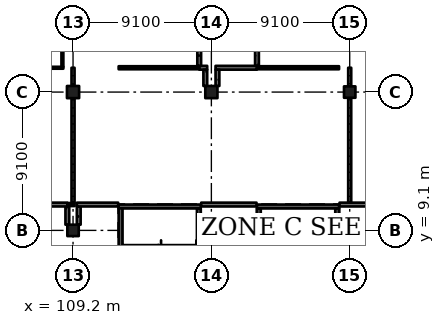
"""IFC4 building model, lengths in metres.
Left out: names, types, materials, properties, quantities, classifications, styles, units other than length and angle.
Written with IfcOpenShell. Run it as: python <this file> out.ifc"""

import sys

from ifc_helpers import new_model, si_unit, direction, frame, frame_2d, origin, origin_2d, place, context, subcontext, project, spatial, rectangle, extrude, element, fill, save


model = new_model("IFC4")
c1 = context("Model", 3, precision=1e-05, world=origin(), true_north=direction((0.0, 1.0)))
c2 = subcontext(c1, "Body", "Model", "MODEL_VIEW")
j1 = project(units=[si_unit("LENGTHUNIT", "METRE"), si_unit("PLANEANGLEUNIT", "RADIAN")], contexts=[c1])
p1 = place(None, origin())
s1 = spatial("IfcSite", under=j1, at=p1, CompositionType="ELEMENT")
p2 = place(p1, origin())
s2 = spatial("IfcBuilding", under=s1, at=p2, CompositionType="ELEMENT")
p3 = place(p2, frame((0.0, 0.0, 10.92)))
s3 = spatial("IfcBuildingStorey", under=s2, at=p3, CompositionType="ELEMENT", Elevation=10.92)
p4 = place(p3, frame((109.2, 9.1, 0.0), z_axis=(0.0, 0.0, 1.0), x_axis=(1.0, 0.0, 0.0)))
e1 = element("IfcColumn", 1, at=p4, inside=s3, PredefinedType="COLUMN", context=c2, shape_type="SweptSolid", body=[
    extrude(rectangle(XDim=0.75, YDim=0.75, at=origin_2d()), origin(), (0.0, 0.0, 1.0), 4.55),
])
p5 = place(p3, frame((109.2, 18.2, 0.0), z_axis=(0.0, 0.0, 1.0), x_axis=(1.0, 0.0, 0.0)))
e2 = element("IfcColumn", 2, at=p5, inside=s3, PredefinedType="COLUMN", context=c2, shape_type="SweptSolid", body=[
    extrude(rectangle(XDim=0.8, YDim=0.8, at=origin_2d()), origin(), (0.0, 0.0, 1.0), 4.55),
])
p6 = place(p3, frame((118.3, 9.1, 0.0), z_axis=(0.0, 0.0, 1.0), x_axis=(1.0, 0.0, 0.0)))
e3 = element("IfcColumn", 3, at=p6, inside=s3, PredefinedType="COLUMN", context=c2, shape_type="SweptSolid", body=[
    extrude(rectangle(XDim=0.65, YDim=0.65, at=origin_2d()), origin(), (0.0, 0.0, 1.0), 4.55),
])
p7 = place(p3, frame((118.3, 18.2, 0.0), z_axis=(0.0, 0.0, 1.0), x_axis=(1.0, 0.0, 0.0)))
e4 = element("IfcColumn", 4, at=p7, inside=s3, PredefinedType="COLUMN", context=c2, shape_type="SweptSolid", body=[
    extrude(rectangle(XDim=0.8, YDim=0.8, at=origin_2d()), origin(), (0.0, 0.0, 1.0), 4.55),
])
p8 = place(p3, frame((127.4, 9.1, 0.0), z_axis=(0.0, 0.0, 1.0), x_axis=(1.0, 0.0, 0.0)))
e5 = element("IfcColumn", 5, at=p8, inside=s3, PredefinedType="COLUMN", context=c2, shape_type="SweptSolid", body=[
    extrude(rectangle(XDim=0.65, YDim=0.65, at=origin_2d()), origin(), (0.0, 0.0, 1.0), 4.55),
])
p9 = place(p3, frame((127.4, 18.2, 0.0), z_axis=(0.0, 0.0, 1.0), x_axis=(1.0, 0.0, 0.0)))
e6 = element("IfcColumn", 6, at=p9, inside=s3, PredefinedType="COLUMN", context=c2, shape_type="SweptSolid", body=[
    extrude(rectangle(XDim=0.75, YDim=0.75, at=origin_2d()), origin(), (0.0, 0.0, 1.0), 4.55),
])
p10 = place(p3, frame((126.7, 10.675, 0.0), z_axis=(0.0, 0.0, 1.0), x_axis=(-1.0, 0.0, 0.0)))
e7 = element("IfcWall", 7, at=p10, inside=s3, PredefinedType="SHEAR", context=c2, shape_type="SweptSolid", body=[
    extrude(rectangle(XDim=5.4, YDim=0.25, at=frame_2d((2.7, 0.0))), origin(), (0.0, 0.0, 1.0), 4.55),
])
p11 = place(p10, frame((1.5, 0.0, 0.0)))
e8 = element("IfcOpeningElement", 8, at=p11, cuts=e7, PredefinedType="OPENING", context=c2, shape_type="SweptSolid", body=[
    extrude(rectangle(XDim=2.4, YDim=2.1, at=frame_2d((1.2, 1.05))), frame((0.0, 0.135, 0.0), z_axis=(0.0, -1.0, 0.0), x_axis=(1.0, 0.0, 0.0)), (0.0, 0.0, 1.0), 0.27),
])
for number, where, z_axis, x_axis in (
    (9, (121.425, 10.55, 0.0), (0.0, 0.0, 1.0), (0.0, -1.0, 0.0)),
    (10, (126.575, 10.55, 0.0), (0.0, 0.0, 1.0), (0.0, -1.0, 0.0)),
):
    element("IfcWall", number, at=place(p3, frame(where, z_axis=z_axis, x_axis=x_axis)), inside=s3, PredefinedType="SHEAR", context=c2, shape_type="SweptSolid", body=[
        extrude(rectangle(XDim=9.6, YDim=0.25, at=frame_2d((4.8, 0.0))), origin(), (0.0, 0.0, 1.0), 4.55),
    ])
p12 = place(p3, frame((117.6, 10.675, 0.0), z_axis=(0.0, 0.0, 1.0), x_axis=(-1.0, 0.0, 0.0)))
e11 = element("IfcWall", 11, at=p12, inside=s3, PredefinedType="SHEAR", context=c2, shape_type="SweptSolid", body=[
    extrude(rectangle(XDim=5.4, YDim=0.25, at=frame_2d((2.7, 0.0))), origin(), (0.0, 0.0, 1.0), 4.55),
])
p13 = place(p12, frame((1.5, 0.0, 0.0)))
e12 = element("IfcOpeningElement", 12, at=p13, cuts=e11, PredefinedType="OPENING", context=c2, shape_type="SweptSolid", body=[
    extrude(rectangle(XDim=2.4, YDim=2.1, at=frame_2d((1.2, 1.05))), frame((0.0, 0.135, 0.0), z_axis=(0.0, -1.0, 0.0), x_axis=(1.0, 0.0, 0.0)), (0.0, 0.0, 1.0), 0.27),
])
for number, where, z_axis, x_axis in (
    (13, (112.325, 10.55, 0.0), (0.0, 0.0, 1.0), (0.0, -1.0, 0.0)),
    (14, (117.475, 10.55, 0.0), (0.0, 0.0, 1.0), (0.0, -1.0, 0.0)),
):
    element("IfcWall", number, at=place(p3, frame(where, z_axis=z_axis, x_axis=x_axis)), inside=s3, PredefinedType="SHEAR", context=c2, shape_type="SweptSolid", body=[
        extrude(rectangle(XDim=9.6, YDim=0.25, at=frame_2d((4.8, 0.0))), origin(), (0.0, 0.0, 1.0), 4.55),
    ])
p14 = place(p3, frame((104.95, 19.8, 0.0), z_axis=(0.0, 0.0, 1.0), x_axis=(1.0, 0.0, 0.0)))
e15 = element("IfcWall", 15, at=p14, inside=s3, PredefinedType="PARTITIONING", context=c2, shape_type="SweptSolid", body=[
    extrude(rectangle(XDim=3.613, YDim=0.125, at=frame_2d((1.806, 0.0))), origin(), (0.0, 0.0, 1.0), 4.25),
])
p15 = place(p14, frame((1.35, 0.0, 0.0)))
e16 = element("IfcOpeningElement", 16, at=p15, cuts=e15, PredefinedType="OPENING", context=c2, shape_type="SweptSolid", body=[
    extrude(rectangle(XDim=0.9, YDim=2.1, at=frame_2d((0.45, 1.05))), frame((0.0, 0.073, 0.0), z_axis=(0.0, -1.0, 0.0), x_axis=(1.0, 0.0, 0.0)), (0.0, 0.0, 1.0), 0.145),
])
p16 = place(p3, frame((108.5, 19.863, 0.0), z_axis=(0.0, 0.0, 1.0), x_axis=(0.0, 1.0, 0.0)))
e17 = element("IfcWall", 17, at=p16, inside=s3, PredefinedType="PARTITIONING", context=c2, shape_type="SweptSolid", body=[
    extrude(rectangle(XDim=7.0, YDim=0.125, at=frame_2d((3.5, 0.0))), origin(), (0.0, 0.0, 1.0), 4.25),
])
p17 = place(p3, frame((108.825, 9.475, 0.0), z_axis=(0.0, 0.0, 1.0), x_axis=(0.0, 1.0, 0.0)))
e18 = element("IfcWall", 18, at=p17, inside=s3, PredefinedType="SOLIDWALL", context=c2, shape_type="SweptSolid", body=[
    extrude(rectangle(XDim=1.2, YDim=0.25, at=frame_2d((0.6, 0.0))), origin(), (0.0, 0.0, 1.0), 4.25),
])
p18 = place(p3, frame((108.825, 10.8, 0.0), z_axis=(0.0, 0.0, 1.0), x_axis=(-1.0, 0.0, 0.0)))
e19 = element("IfcWall", 19, at=p18, inside=s3, PredefinedType="SOLIDWALL", context=c2, shape_type="SweptSolid", body=[
    extrude(rectangle(XDim=4.05, YDim=0.25, at=frame_2d((2.025, 0.0))), origin(), (0.0, 0.0, 1.0), 4.25),
])
p19 = place(p18, frame((1.15, 0.0, 0.0)))
e20 = element("IfcOpeningElement", 20, at=p19, cuts=e19, PredefinedType="OPENING", context=c2, shape_type="SweptSolid", body=[
    extrude(rectangle(XDim=1.8, YDim=2.1, at=frame_2d((0.9, 1.05))), frame((0.0, 0.135, 0.0), z_axis=(0.0, -1.0, 0.0), x_axis=(1.0, 0.0, 0.0)), (0.0, 0.0, 1.0), 0.27),
])
p20 = place(p3, frame((108.825, 10.8, 0.0), z_axis=(0.0, 0.0, 1.0), x_axis=(1.0, 0.0, 0.0)))
e21 = element("IfcWall", 21, at=p20, inside=s3, PredefinedType="PARTITIONING", context=c2, shape_type="SweptSolid", body=[
    extrude(rectangle(XDim=0.475, YDim=0.2, at=frame_2d((0.238, 0.0))), origin(), (0.0, 0.0, 1.0), 4.25),
])
p21 = place(p3, frame((109.2, 10.9, 0.0), z_axis=(0.0, 0.0, 1.0), x_axis=(0.0, 1.0, 0.0)))
e22 = element("IfcWall", 22, at=p21, inside=s3, PredefinedType="PARTITIONING", context=c2, shape_type="SweptSolid", body=[
    extrude(rectangle(XDim=6.9, YDim=0.2, at=frame_2d((3.45, 0.0))), origin(), (0.0, 0.0, 1.0), 3.55),
])
p22 = place(p21, frame((0.85, 0.0, 0.0)))
e23 = element("IfcOpeningElement", 23, at=p22, cuts=e22, PredefinedType="OPENING", context=c2, shape_type="SweptSolid", body=[
    extrude(rectangle(XDim=1.8, YDim=2.4, at=frame_2d((0.9, 1.2))), frame((0.0, 0.11, 0.0), z_axis=(0.0, -1.0, 0.0), x_axis=(1.0, 0.0, 0.0)), (0.0, 0.0, 1.0), 0.22),
])
p23 = place(p21, frame((4.25, 0.0, 0.0)))
e24 = element("IfcOpeningElement", 24, at=p23, cuts=e22, PredefinedType="OPENING", context=c2, shape_type="SweptSolid", body=[
    extrude(rectangle(XDim=1.8, YDim=2.4, at=frame_2d((0.9, 1.2))), frame((0.0, 0.11, 0.0), z_axis=(0.0, -1.0, 0.0), x_axis=(1.0, 0.0, 0.0)), (0.0, 0.0, 1.0), 0.22),
])
p24 = place(p3, frame((109.2, 18.6, 0.0), z_axis=(0.0, 0.0, 1.0), x_axis=(0.0, 1.0, 0.0)))
e25 = element("IfcWall", 25, at=p24, inside=s3, PredefinedType="PARTITIONING", context=c2, shape_type="SweptSolid", body=[
    extrude(rectangle(XDim=1.2, YDim=0.2, at=frame_2d((0.6, 0.0))), origin(), (0.0, 0.0, 1.0), 3.55),
])
p25 = place(p3, frame((109.575, 10.675, 0.0), z_axis=(0.0, 0.0, 1.0), x_axis=(0.0, -1.0, 0.0)))
e26 = element("IfcWall", 26, at=p25, inside=s3, PredefinedType="SOLIDWALL", context=c2, shape_type="SweptSolid", body=[
    extrude(rectangle(XDim=1.2, YDim=0.25, at=frame_2d((0.6, 0.0))), origin(), (0.0, 0.0, 1.0), 4.25),
])
p26 = place(p3, frame((112.17, 10.8, 0.0), z_axis=(0.0, 0.0, 1.0), x_axis=(-1.0, 0.0, 0.0)))
e27 = element("IfcWall", 27, at=p26, inside=s3, PredefinedType="SOLIDWALL", context=c2, shape_type="SweptSolid", body=[
    extrude(rectangle(XDim=2.72, YDim=0.25, at=frame_2d((1.36, 0.0))), origin(), (0.0, 0.0, 1.0), 4.25),
])
p27 = place(p3, frame((112.2, 19.8, 0.0), z_axis=(0.0, 0.0, 1.0), x_axis=(1.0, 0.0, 0.0)))
e28 = element("IfcWall", 28, at=p27, inside=s3, PredefinedType="PARTITIONING", context=c2, shape_type="SweptSolid", body=[
    extrude(rectangle(XDim=5.3, YDim=0.2, at=frame_2d((2.65, 0.0))), origin(), (0.0, 0.0, 1.0), 4.25),
])
p28 = place(p27, frame((1.75, 0.0, 0.0)))
e29 = element("IfcOpeningElement", 29, at=p28, cuts=e28, PredefinedType="OPENING", context=c2, shape_type="SweptSolid", body=[
    extrude(rectangle(XDim=1.8, YDim=2.4, at=frame_2d((0.9, 1.2))), frame((0.0, 0.11, 0.0), z_axis=(0.0, -1.0, 0.0), x_axis=(1.0, 0.0, 0.0)), (0.0, 0.0, 1.0), 0.22),
])
p29 = place(p3, frame((117.5, 19.8, 0.0), z_axis=(0.0, 0.0, 1.0), x_axis=(1.0, 0.0, 0.0)))
e30 = element("IfcWall", 30, at=p29, inside=s3, PredefinedType="SOLIDWALL", context=c2, shape_type="SweptSolid", body=[
    extrude(rectangle(XDim=0.525, YDim=0.25, at=frame_2d((0.262, 0.0))), origin(), (0.0, 0.0, 1.0), 4.25),
])
p30 = place(p3, frame((117.5, 19.925, 0.0), z_axis=(0.0, 0.0, 1.0), x_axis=(0.0, 1.0, 0.0)))
e31 = element("IfcWall", 31, at=p30, inside=s3, PredefinedType="SOLIDWALL", context=c2, shape_type="SweptSolid", body=[
    extrude(rectangle(XDim=2.845, YDim=0.25, at=frame_2d((1.422, 0.0))), origin(), (0.0, 0.0, 1.0), 4.25),
])
p31 = place(p3, frame((117.63, 8.775, 0.0), z_axis=(0.0, 0.0, 1.0), x_axis=(1.0, 0.0, 0.0)))
e32 = element("IfcWall", 32, at=p31, inside=s3, PredefinedType="SOLIDWALL", context=c2, shape_type="SweptSolid", body=[
    extrude(rectangle(XDim=0.345, YDim=0.25, at=frame_2d((0.173, 0.0))), origin(), (0.0, 0.0, 1.0), 4.25),
])
p32 = place(p3, frame((117.9, 19.675, 0.0), z_axis=(0.0, 0.0, 1.0), x_axis=(0.0, -1.0, 0.0)))
e33 = element("IfcWall", 33, at=p32, inside=s3, PredefinedType="SOLIDWALL", context=c2, shape_type="SweptSolid", body=[
    extrude(rectangle(XDim=1.075, YDim=0.25, at=frame_2d((0.538, 0.0))), origin(), (0.0, 0.0, 1.0), 4.25),
])
p33 = place(p3, frame((117.975, 9.425, 0.0), z_axis=(0.0, 0.0, 1.0), x_axis=(-1.0, 0.0, 0.0)))
e34 = element("IfcWall", 34, at=p33, inside=s3, PredefinedType="SOLIDWALL", context=c2, shape_type="SweptSolid", body=[
    extrude(rectangle(XDim=0.345, YDim=0.25, at=frame_2d((0.173, 0.0))), origin(), (0.0, 0.0, 1.0), 4.25),
])
p34 = place(p3, frame((118.575, 19.8, 0.0), z_axis=(0.0, 0.0, 1.0), x_axis=(1.0, 0.0, 0.0)))
e35 = element("IfcWall", 35, at=p34, inside=s3, PredefinedType="SOLIDWALL", context=c2, shape_type="SweptSolid", body=[
    extrude(rectangle(XDim=2.725, YDim=0.25, at=frame_2d((1.363, 0.0))), origin(), (0.0, 0.0, 1.0), 4.25),
])
p35 = place(p34, frame((0.85, 0.0, 0.0)))
e36 = element("IfcOpeningElement", 36, at=p35, cuts=e35, PredefinedType="OPENING", context=c2, shape_type="SweptSolid", body=[
    extrude(rectangle(XDim=1.0, YDim=2.1, at=frame_2d((0.5, 1.05))), frame((0.0, 0.135, 0.0), z_axis=(0.0, -1.0, 0.0), x_axis=(1.0, 0.0, 0.0)), (0.0, 0.0, 1.0), 0.27),
])
p36 = place(p3, frame((118.7, 18.6, 0.0), z_axis=(0.0, 0.0, 1.0), x_axis=(0.0, 1.0, 0.0)))
e37 = element("IfcWall", 37, at=p36, inside=s3, PredefinedType="SOLIDWALL", context=c2, shape_type="SweptSolid", body=[
    extrude(rectangle(XDim=1.075, YDim=0.25, at=frame_2d((0.538, 0.0))), origin(), (0.0, 0.0, 1.0), 4.25),
])
p37 = place(p3, frame((121.27, 10.8, 0.0), z_axis=(0.0, 0.0, 1.0), x_axis=(-1.0, 0.0, 0.0)))
e38 = element("IfcWall", 38, at=p37, inside=s3, PredefinedType="SOLIDWALL", context=c2, shape_type="SweptSolid", body=[
    extrude(rectangle(XDim=3.64, YDim=0.25, at=frame_2d((1.82, 0.0))), origin(), (0.0, 0.0, 1.0), 4.25),
])
p38 = place(p37, frame((1.45, 0.0, 0.0)))
e39 = element("IfcOpeningElement", 39, at=p38, cuts=e38, PredefinedType="OPENING", context=c2, shape_type="SweptSolid", body=[
    extrude(rectangle(XDim=0.8, YDim=2.1, at=frame_2d((0.4, 1.05))), frame((0.0, 0.135, 0.0), z_axis=(0.0, -1.0, 0.0), x_axis=(1.0, 0.0, 0.0)), (0.0, 0.0, 1.0), 0.27),
])
p39 = place(p3, frame((121.3, 19.8, 0.0), z_axis=(0.0, 0.0, 1.0), x_axis=(1.0, 0.0, 0.0)))
e40 = element("IfcWall", 40, at=p39, inside=s3, PredefinedType="PARTITIONING", context=c2, shape_type="SweptSolid", body=[
    extrude(rectangle(XDim=5.4, YDim=0.2, at=frame_2d((2.7, 0.0))), origin(), (0.0, 0.0, 1.0), 4.25),
])
p40 = place(p39, frame((1.85, 0.0, 0.0)))
e41 = element("IfcOpeningElement", 41, at=p40, cuts=e40, PredefinedType="OPENING", context=c2, shape_type="SweptSolid", body=[
    extrude(rectangle(XDim=1.8, YDim=2.4, at=frame_2d((0.9, 1.2))), frame((0.0, 0.11, 0.0), z_axis=(0.0, -1.0, 0.0), x_axis=(1.0, 0.0, 0.0)), (0.0, 0.0, 1.0), 0.22),
])
p41 = place(p3, frame((121.3, 22.675, 0.0), z_axis=(0.0, 0.0, 1.0), x_axis=(0.0, -1.0, 0.0)))
e42 = element("IfcWall", 42, at=p41, inside=s3, PredefinedType="SOLIDWALL", context=c2, shape_type="SweptSolid", body=[
    extrude(rectangle(XDim=2.75, YDim=0.25, at=frame_2d((1.375, 0.0))), origin(), (0.0, 0.0, 1.0), 4.25),
])
for number, where, z_axis, x_axis in (
    (43, (126.73, 8.775, 0.0), (0.0, 0.0, 1.0), (1.0, 0.0, 0.0)),
    (44, (127.075, 9.425, 0.0), (0.0, 0.0, 1.0), (-1.0, 0.0, 0.0)),
):
    element("IfcWall", number, at=place(p3, frame(where, z_axis=z_axis, x_axis=x_axis)), inside=s3, PredefinedType="SOLIDWALL", context=c2, shape_type="SweptSolid", body=[
        extrude(rectangle(XDim=0.345, YDim=0.25, at=frame_2d((0.172, 0.0))), origin(), (0.0, 0.0, 1.0), 4.25),
    ])
p42 = place(p3, frame((126.73, 10.8, 0.0), z_axis=(0.0, 0.0, 1.0), x_axis=(1.0, 0.0, 0.0)))
e45 = element("IfcWall", 45, at=p42, inside=s3, PredefinedType="SOLIDWALL", context=c2, shape_type="SweptSolid", body=[
    extrude(rectangle(XDim=3.64, YDim=0.25, at=frame_2d((1.82, 0.0))), origin(), (0.0, 0.0, 1.0), 4.25),
])
p43 = place(p42, frame((1.69, 0.0, 0.0)))
e46 = element("IfcOpeningElement", 46, at=p43, cuts=e45, PredefinedType="OPENING", context=c2, shape_type="SweptSolid", body=[
    extrude(rectangle(XDim=1.0, YDim=2.1, at=frame_2d((0.5, 1.05))), frame((0.0, 0.135, 0.0), z_axis=(0.0, -1.0, 0.0), x_axis=(1.0, 0.0, 0.0)), (0.0, 0.0, 1.0), 0.27),
])
p44 = place(p3, frame((127.4, 10.925, 0.0), z_axis=(0.0, 0.0, 1.0), x_axis=(0.0, 1.0, 0.0)))
e47 = element("IfcWall", 47, at=p44, inside=s3, PredefinedType="PARTITIONING", context=c2, shape_type="SweptSolid", body=[
    extrude(rectangle(XDim=6.9, YDim=0.2, at=frame_2d((3.45, 0.0))), origin(), (0.0, 0.0, 1.0), 3.55),
])
p45 = place(p44, frame((0.85, 0.0, 0.0)))
e48 = element("IfcOpeningElement", 48, at=p45, cuts=e47, PredefinedType="OPENING", context=c2, shape_type="SweptSolid", body=[
    extrude(rectangle(XDim=1.8, YDim=2.4, at=frame_2d((0.9, 1.2))), frame((0.0, 0.11, 0.0), z_axis=(0.0, -1.0, 0.0), x_axis=(1.0, 0.0, 0.0)), (0.0, 0.0, 1.0), 0.22),
])
p46 = place(p44, frame((4.25, 0.0, 0.0)))
e49 = element("IfcOpeningElement", 49, at=p46, cuts=e47, PredefinedType="OPENING", context=c2, shape_type="SweptSolid", body=[
    extrude(rectangle(XDim=1.8, YDim=2.4, at=frame_2d((0.9, 1.2))), frame((0.0, 0.11, 0.0), z_axis=(0.0, -1.0, 0.0), x_axis=(1.0, 0.0, 0.0)), (0.0, 0.0, 1.0), 0.22),
])
p47 = place(p3, frame((127.4, 18.575, 0.0), z_axis=(0.0, 0.0, 1.0), x_axis=(0.0, 1.0, 0.0)))
e50 = element("IfcWall", 50, at=p47, inside=s3, PredefinedType="PARTITIONING", context=c2, shape_type="SweptSolid", body=[
    extrude(rectangle(XDim=1.225, YDim=0.2, at=frame_2d((0.613, 0.0))), origin(), (0.0, 0.0, 1.0), 3.55),
])
p48 = place(p35, origin())
e51 = element("IfcDoor", 51, at=p48, inside=s3, OperationType="SINGLE_SWING_RIGHT", PredefinedType="DOOR", context=c2, shape_type="SweptSolid", body=[
    extrude(rectangle(XDim=1.0, YDim=2.1, at=frame_2d((0.5, 1.05))), frame((0.0, 0.025, 0.0), z_axis=(0.0, -1.0, 0.0), x_axis=(1.0, 0.0, 0.0)), (0.0, 0.0, 1.0), 0.05),
])
fill(e36, e51)
p49 = place(p38, origin())
e52 = element("IfcDoor", 52, at=p49, inside=s3, OperationType="SINGLE_SWING_LEFT", PredefinedType="DOOR", context=c2, shape_type="SweptSolid", body=[
    extrude(rectangle(XDim=0.8, YDim=2.1, at=frame_2d((0.4, 1.05))), frame((0.0, 0.025, 0.0), z_axis=(0.0, -1.0, 0.0), x_axis=(1.0, 0.0, 0.0)), (0.0, 0.0, 1.0), 0.05),
])
fill(e39, e52)
p50 = place(p45, origin())
e53 = element("IfcDoor", 53, at=p50, inside=s3, OperationType="DOUBLE_DOOR_SINGLE_SWING", PredefinedType="DOOR", context=c2, shape_type="SweptSolid", body=[
    extrude(rectangle(XDim=1.8, YDim=2.4, at=frame_2d((0.9, 1.2))), frame((0.0, 0.025, 0.0), z_axis=(0.0, -1.0, 0.0), x_axis=(1.0, 0.0, 0.0)), (0.0, 0.0, 1.0), 0.05),
])
fill(e48, e53)
p51 = place(p46, origin())
e54 = element("IfcDoor", 54, at=p51, inside=s3, OperationType="DOUBLE_DOOR_SINGLE_SWING", PredefinedType="DOOR", context=c2, shape_type="SweptSolid", body=[
    extrude(rectangle(XDim=1.8, YDim=2.4, at=frame_2d((0.9, 1.2))), frame((0.0, 0.025, 0.0), z_axis=(0.0, -1.0, 0.0), x_axis=(1.0, 0.0, 0.0)), (0.0, 0.0, 1.0), 0.05),
])
fill(e49, e54)
p52 = place(p22, origin())
e55 = element("IfcDoor", 55, at=p52, inside=s3, OperationType="DOUBLE_DOOR_SINGLE_SWING", PredefinedType="DOOR", context=c2, shape_type="SweptSolid", body=[
    extrude(rectangle(XDim=1.8, YDim=2.4, at=frame_2d((0.9, 1.2))), frame((0.0, 0.025, 0.0), z_axis=(0.0, -1.0, 0.0), x_axis=(1.0, 0.0, 0.0)), (0.0, 0.0, 1.0), 0.05),
])
fill(e23, e55)
p53 = place(p23, origin())
e56 = element("IfcDoor", 56, at=p53, inside=s3, OperationType="DOUBLE_DOOR_SINGLE_SWING", PredefinedType="DOOR", context=c2, shape_type="SweptSolid", body=[
    extrude(rectangle(XDim=1.8, YDim=2.4, at=frame_2d((0.9, 1.2))), frame((0.0, 0.025, 0.0), z_axis=(0.0, -1.0, 0.0), x_axis=(1.0, 0.0, 0.0)), (0.0, 0.0, 1.0), 0.05),
])
fill(e24, e56)
p54 = place(p28, origin())
e57 = element("IfcDoor", 57, at=p54, inside=s3, OperationType="DOUBLE_DOOR_SINGLE_SWING", PredefinedType="DOOR", context=c2, shape_type="SweptSolid", body=[
    extrude(rectangle(XDim=1.8, YDim=2.4, at=frame_2d((0.9, 1.2))), frame((0.0, 0.025, 0.0), z_axis=(0.0, -1.0, 0.0), x_axis=(1.0, 0.0, 0.0)), (0.0, 0.0, 1.0), 0.05),
])
fill(e29, e57)
p55 = place(p40, origin())
e58 = element("IfcDoor", 58, at=p55, inside=s3, OperationType="DOUBLE_DOOR_SINGLE_SWING", PredefinedType="DOOR", context=c2, shape_type="SweptSolid", body=[
    extrude(rectangle(XDim=1.8, YDim=2.4, at=frame_2d((0.9, 1.2))), frame((0.0, 0.025, 0.0), z_axis=(0.0, -1.0, 0.0), x_axis=(1.0, 0.0, 0.0)), (0.0, 0.0, 1.0), 0.05),
])
fill(e41, e58)
p56 = place(p11, origin())
e59 = element("IfcDoor", 59, at=p56, inside=s3, OperationType="DOUBLE_DOOR_SINGLE_SWING", PredefinedType="DOOR", context=c2, shape_type="SweptSolid", body=[
    extrude(rectangle(XDim=2.4, YDim=2.1, at=frame_2d((1.2, 1.05))), frame((0.0, 0.025, 0.0), z_axis=(0.0, -1.0, 0.0), x_axis=(1.0, 0.0, 0.0)), (0.0, 0.0, 1.0), 0.05),
])
fill(e8, e59)
p57 = place(p13, origin())
e60 = element("IfcDoor", 60, at=p57, inside=s3, OperationType="DOUBLE_DOOR_SINGLE_SWING", PredefinedType="DOOR", context=c2, shape_type="SweptSolid", body=[
    extrude(rectangle(XDim=2.4, YDim=2.1, at=frame_2d((1.2, 1.05))), frame((0.0, 0.025, 0.0), z_axis=(0.0, -1.0, 0.0), x_axis=(1.0, 0.0, 0.0)), (0.0, 0.0, 1.0), 0.05),
])
fill(e12, e60)
save(model, sys.argv[1])
